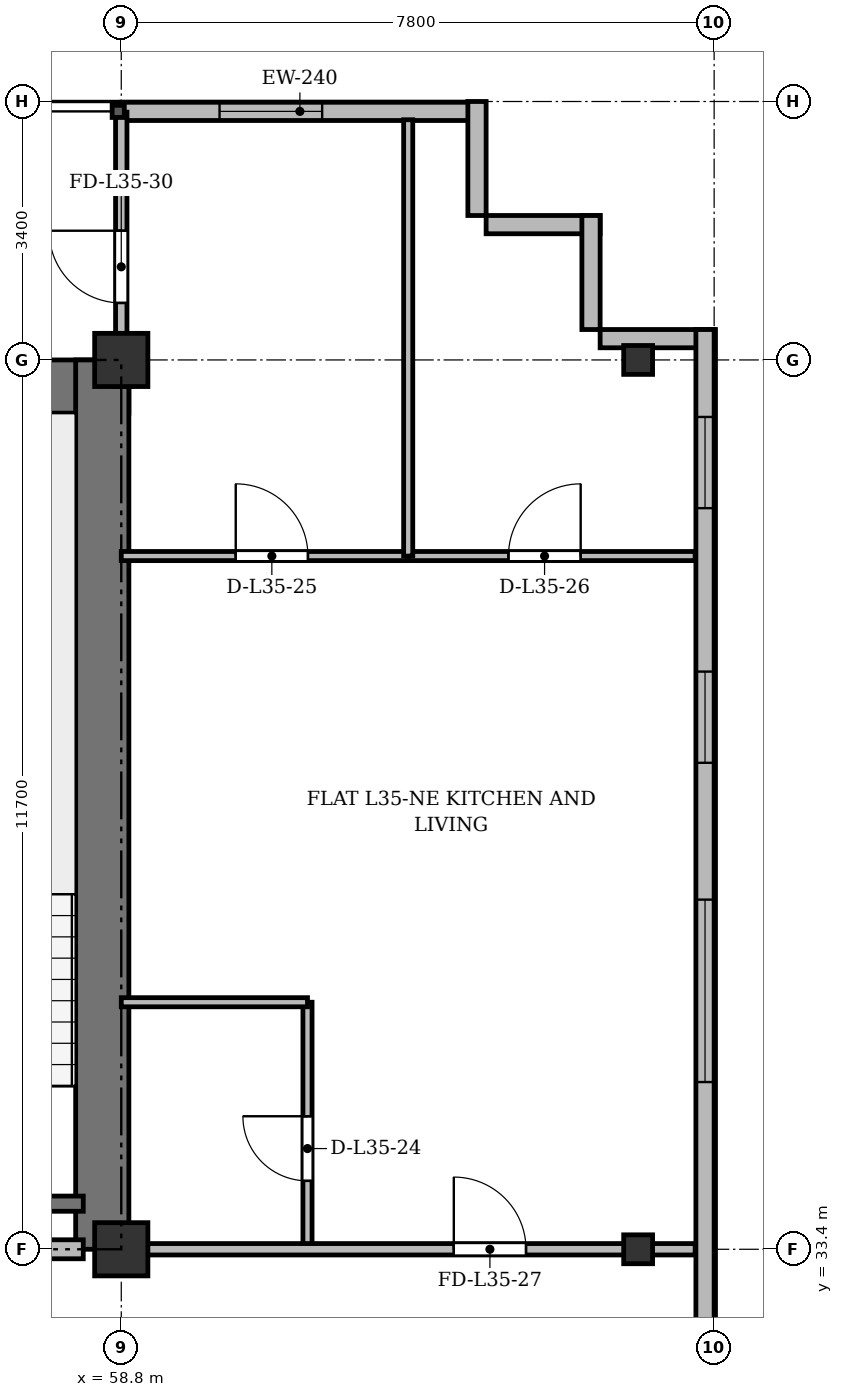
"""IFC4 building model, lengths in metres.
Left out: names, types, materials, properties, quantities, classifications, styles, units other than length and angle.
Written with IfcOpenShell. Run it as: python <this file> out.ifc"""

import sys

from ifc_helpers import new_model, si_unit, direction, frame, frame_2d, origin, origin_2d, place, context, subcontext, project, spatial, rectangle, i_section, extrude, source, transform, mapped, element, fill, save


model = new_model("IFC4")
c1 = context("Model", 3, precision=1e-05, world=origin(), true_north=direction((0.0, 1.0)))
c2 = subcontext(c1, "Body", "Model", "MODEL_VIEW")
j1 = project(units=[si_unit("LENGTHUNIT", "METRE"), si_unit("PLANEANGLEUNIT", "RADIAN")], contexts=[c1])
p1 = place(None, origin())
s1 = spatial("IfcSite", under=j1, at=p1, CompositionType="ELEMENT")
p2 = place(p1, origin())
s2 = spatial("IfcBuilding", under=s1, at=p2, CompositionType="ELEMENT")
p3 = place(p2, frame((0.0, 0.0, 135.7)))
s3 = spatial("IfcBuildingStorey", under=s2, at=p3, CompositionType="ELEMENT", Elevation=135.7)
m1 = source(origin(), c2, "Body", "SweptSolid", [
    extrude(rectangle(XDim=0.7, YDim=0.7, at=origin_2d()), origin(), (0.0, 0.0, 1.0), 3.6),
])
for number, where, z_axis, x_axis in (
    (1, (58.8, 33.4, 0.0), (0.0, 0.0, 1.0), (1.0, 0.0, 0.0)),
    (2, (58.8, 45.1, 0.0), (0.0, 0.0, 1.0), (1.0, 0.0, 0.0)),
):
    element("IfcColumn", number, at=place(p3, frame(where, z_axis=z_axis, x_axis=x_axis)), inside=s3, PredefinedType="COLUMN", context=c2, shape_type="MappedRepresentation", body=[
        mapped(m1, transform((0.0, 0.0, 0.0), x_axis=(1.0, 0.0, 0.0), y_axis=(0.0, 1.0, 0.0), z_axis=(0.0, 0.0, 1.0), scale=1.0)),
    ])
m2 = source(origin(), c2, "Body", "SweptSolid", [
    extrude(i_section(OverallWidth=0.38, OverallDepth=0.38, WebThickness=0.02, FlangeThickness=0.03, at=origin_2d()), origin(), (0.0, 0.0, 1.0), 3.6),
])
for number, where, z_axis, x_axis in (
    (3, (65.6, 33.4, 0.0), (0.0, 0.0, 1.0), (1.0, 0.0, 0.0)),
    (4, (65.6, 45.1, 0.0), (0.0, 0.0, 1.0), (1.0, 0.0, 0.0)),
):
    element("IfcColumn", number, at=place(p3, frame(where, z_axis=z_axis, x_axis=x_axis)), inside=s3, PredefinedType="COLUMN", context=c2, shape_type="MappedRepresentation", body=[
        mapped(m2, transform((0.0, 0.0, 0.0), x_axis=(1.0, 0.0, 0.0), y_axis=(0.0, 1.0, 0.0), z_axis=(0.0, 0.0, 1.0), scale=1.0)),
    ])
p4 = place(p3, frame((58.8, 48.37, 0.0), z_axis=(0.0, 0.0, 1.0), x_axis=(1.0, 0.0, 0.0)))
e5 = element("IfcWall", 5, at=p4, inside=s3, PredefinedType="SOLIDWALL", context=c2, shape_type="SweptSolid", body=[
    extrude(rectangle(XDim=4.7, YDim=0.24, at=frame_2d((2.35, 0.0))), origin(), (0.0, 0.0, 1.0), 3.35),
])
p5 = place(p4, frame((1.293, 0.0, 0.9)))
e6 = element("IfcOpeningElement", 6, at=p5, cuts=e5, PredefinedType="OPENING", context=c2, shape_type="SweptSolid", body=[
    extrude(rectangle(XDim=1.35, YDim=1.5, at=frame_2d((0.675, 0.75))), frame((0.0, 0.13, 0.0), z_axis=(0.0, -1.0, 0.0), x_axis=(1.0, 0.0, 0.0)), (0.0, 0.0, 1.0), 0.26),
])
for number, where, z_axis, x_axis in (
    (7, (63.48, 48.5, 0.0), (0.0, 0.0, 1.0), (0.0, -1.0, 0.0)),
    (8, (63.6, 46.88, 0.0), (0.0, 0.0, 1.0), (1.0, 0.0, 0.0)),
    (9, (64.98, 47.0, 0.0), (0.0, 0.0, 1.0), (0.0, -1.0, 0.0)),
    (10, (65.1, 45.38, 0.0), (0.0, 0.0, 1.0), (1.0, 0.0, 0.0)),
):
    element("IfcWall", number, at=place(p3, frame(where, z_axis=z_axis, x_axis=x_axis)), inside=s3, PredefinedType="SOLIDWALL", context=c2, shape_type="SweptSolid", body=[
        extrude(rectangle(XDim=1.5, YDim=0.24, at=frame_2d((0.75, 0.0))), origin(), (0.0, 0.0, 1.0), 3.35),
    ])
p6 = place(p3, frame((66.48, 45.5, 0.0), z_axis=(0.0, 0.0, 1.0), x_axis=(0.0, -1.0, 0.0)))
e11 = element("IfcWall", 11, at=p6, inside=s3, PredefinedType="SOLIDWALL", context=c2, shape_type="SweptSolid", body=[
    extrude(rectangle(XDim=39.2, YDim=0.24, at=frame_2d((19.6, 0.0))), origin(), (0.0, 0.0, 1.0), 3.35),
])
p7 = place(p6, frame((36.55, 0.0, 0.92)))
e12 = element("IfcOpeningElement", 12, at=p7, cuts=e11, PredefinedType="OPENING", context=c2, shape_type="SweptSolid", body=[
    extrude(rectangle(XDim=1.2, YDim=1.65, at=frame_2d((0.6, 0.825))), frame((0.0, 0.13, 0.0), z_axis=(0.0, -1.0, 0.0), x_axis=(1.0, 0.0, 0.0)), (0.0, 0.0, 1.0), 0.26),
])
p8 = place(p6, frame((32.9, 0.0, 0.92)))
e13 = element("IfcOpeningElement", 13, at=p8, cuts=e11, PredefinedType="OPENING", context=c2, shape_type="SweptSolid", body=[
    extrude(rectangle(XDim=2.4, YDim=2.1, at=frame_2d((1.2, 1.05))), frame((0.0, 0.13, 0.0), z_axis=(0.0, -1.0, 0.0), x_axis=(1.0, 0.0, 0.0)), (0.0, 0.0, 1.0), 0.26),
])
p9 = place(p6, frame((28.7, 0.0, 0.92)))
e14 = element("IfcOpeningElement", 14, at=p9, cuts=e11, PredefinedType="OPENING", context=c2, shape_type="SweptSolid", body=[
    extrude(rectangle(XDim=2.4, YDim=2.1, at=frame_2d((1.2, 1.05))), frame((0.0, 0.13, 0.0), z_axis=(0.0, -1.0, 0.0), x_axis=(1.0, 0.0, 0.0)), (0.0, 0.0, 1.0), 0.26),
])
p10 = place(p6, frame((21.5, 0.0, 0.92)))
e15 = element("IfcOpeningElement", 15, at=p10, cuts=e11, PredefinedType="OPENING", context=c2, shape_type="SweptSolid", body=[
    extrude(rectangle(XDim=2.4, YDim=2.1, at=frame_2d((1.2, 1.05))), frame((0.0, 0.13, 0.0), z_axis=(0.0, -1.0, 0.0), x_axis=(1.0, 0.0, 0.0)), (0.0, 0.0, 1.0), 0.26),
])
p11 = place(p6, frame((7.5, 0.0, 0.92)))
e16 = element("IfcOpeningElement", 16, at=p11, cuts=e11, PredefinedType="OPENING", context=c2, shape_type="SweptSolid", body=[
    extrude(rectangle(XDim=2.4, YDim=2.1, at=frame_2d((1.2, 1.05))), frame((0.0, 0.13, 0.0), z_axis=(0.0, -1.0, 0.0), x_axis=(1.0, 0.0, 0.0)), (0.0, 0.0, 1.0), 0.26),
])
p12 = place(p6, frame((4.5, 0.0, 0.92)))
e17 = element("IfcOpeningElement", 17, at=p12, cuts=e11, PredefinedType="OPENING", context=c2, shape_type="SweptSolid", body=[
    extrude(rectangle(XDim=1.2, YDim=1.65, at=frame_2d((0.6, 0.825))), frame((0.0, 0.13, 0.0), z_axis=(0.0, -1.0, 0.0), x_axis=(1.0, 0.0, 0.0)), (0.0, 0.0, 1.0), 0.26),
])
p13 = place(p6, frame((1.15, 0.0, 0.92)))
e18 = element("IfcOpeningElement", 18, at=p13, cuts=e11, PredefinedType="OPENING", context=c2, shape_type="SweptSolid", body=[
    extrude(rectangle(XDim=1.2, YDim=1.65, at=frame_2d((0.6, 0.825))), frame((0.0, 0.13, 0.0), z_axis=(0.0, -1.0, 0.0), x_axis=(1.0, 0.0, 0.0)), (0.0, 0.0, 1.0), 0.26),
])
p14 = place(p3, frame((15.5, 44.75, 0.0), z_axis=(0.0, 0.0, 1.0), x_axis=(1.0, 0.0, 0.0)))
e19 = element("IfcWall", 19, at=p14, inside=s3, PredefinedType="SHEAR", context=c2, shape_type="SweptSolid", body=[
    extrude(rectangle(XDim=43.4, YDim=0.7, at=frame_2d((21.7, 0.0))), origin(), (0.0, 0.0, 1.0), 3.35),
])
p15 = place(p3, frame((58.55, 33.4, 0.0), z_axis=(0.0, 0.0, 1.0), x_axis=(0.0, 1.0, 0.0)))
e20 = element("IfcWall", 20, at=p15, inside=s3, PredefinedType="SHEAR", context=c2, shape_type="SweptSolid", body=[
    extrude(rectangle(XDim=11.7, YDim=0.7, at=frame_2d((5.85, 0.0))), origin(), (0.0, 0.0, 1.0), 3.35),
])
p16 = place(p3, frame((54.9, 34.0, 0.0), z_axis=(0.0, 0.0, 1.0), x_axis=(1.0, 0.0, 0.0)))
e21 = element("IfcWall", 21, at=p16, inside=s3, PredefinedType="SHEAR", context=c2, shape_type="SweptSolid", body=[
    extrude(rectangle(XDim=3.4, YDim=0.2, at=frame_2d((1.7, 0.0))), origin(), (0.0, 0.0, 1.0), 3.35),
])
p17 = place(p3, frame((47.15, 33.4, 0.0), z_axis=(0.0, 0.0, 1.0), x_axis=(1.0, 0.0, 0.0)))
e22 = element("IfcWall", 22, at=p17, inside=s3, PredefinedType="PARTITIONING", context=c2, shape_type="SweptSolid", body=[
    extrude(rectangle(XDim=11.15, YDim=0.25, at=frame_2d((5.575, 0.0))), origin(), (0.0, 0.0, 1.0), 2.75),
])
p18 = place(p17, frame((0.7, 0.0, 0.0)))
e23 = element("IfcOpeningElement", 23, at=p18, cuts=e22, PredefinedType="OPENING", context=c2, shape_type="SweptSolid", body=[
    extrude(rectangle(XDim=0.95, YDim=2.15, at=frame_2d((0.475, 1.075))), frame((0.0, 0.135, 0.0), z_axis=(0.0, -1.0, 0.0), x_axis=(1.0, 0.0, 0.0)), (0.0, 0.0, 1.0), 0.27),
])
p19 = place(p17, frame((6.0, 0.0, 0.0)))
e24 = element("IfcOpeningElement", 24, at=p19, cuts=e22, PredefinedType="OPENING", context=c2, shape_type="SweptSolid", body=[
    extrude(rectangle(XDim=1.2, YDim=2.15, at=frame_2d((0.6, 1.075))), frame((0.0, 0.135, 0.0), z_axis=(0.0, -1.0, 0.0), x_axis=(1.0, 0.0, 0.0)), (0.0, 0.0, 1.0), 0.27),
])
p20 = place(p3, frame((61.25, 33.4, 0.0), z_axis=(0.0, 0.0, 1.0), x_axis=(0.0, 1.0, 0.0)))
e25 = element("IfcWall", 25, at=p20, inside=s3, PredefinedType="PARTITIONING", context=c2, shape_type="SweptSolid", body=[
    extrude(rectangle(XDim=3.25, YDim=0.12, at=frame_2d((1.625, 0.0))), origin(), (0.0, 0.0, 1.0), 2.75),
])
p21 = place(p20, frame((0.9, 0.0, 0.0)))
e26 = element("IfcOpeningElement", 26, at=p21, cuts=e25, PredefinedType="OPENING", context=c2, shape_type="SweptSolid", body=[
    extrude(rectangle(XDim=0.85, YDim=2.1, at=frame_2d((0.425, 1.05))), frame((0.0, 0.07, 0.0), z_axis=(0.0, -1.0, 0.0), x_axis=(1.0, 0.0, 0.0)), (0.0, 0.0, 1.0), 0.14),
])
p22 = place(p3, frame((58.8, 36.65, 0.0), z_axis=(0.0, 0.0, 1.0), x_axis=(1.0, 0.0, 0.0)))
e27 = element("IfcWall", 27, at=p22, inside=s3, PredefinedType="PARTITIONING", context=c2, shape_type="SweptSolid", body=[
    extrude(rectangle(XDim=2.45, YDim=0.12, at=frame_2d((1.225, 0.0))), origin(), (0.0, 0.0, 1.0), 2.85),
])
p23 = place(p3, frame((58.8, 42.52, 0.0), z_axis=(0.0, 0.0, 1.0), x_axis=(1.0, 0.0, 0.0)))
e28 = element("IfcWall", 28, at=p23, inside=s3, PredefinedType="PARTITIONING", context=c2, shape_type="SweptSolid", body=[
    extrude(rectangle(XDim=3.775, YDim=0.12, at=frame_2d((1.887, 0.0))), origin(), (0.0, 0.0, 1.0), 2.85),
])
p24 = place(p23, frame((1.506, 0.0, 0.0)))
e29 = element("IfcOpeningElement", 29, at=p24, cuts=e28, PredefinedType="OPENING", context=c2, shape_type="SweptSolid", body=[
    extrude(rectangle(XDim=0.95, YDim=2.15, at=frame_2d((0.475, 1.075))), frame((0.0, 0.07, 0.0), z_axis=(0.0, -1.0, 0.0), x_axis=(1.0, 0.0, 0.0)), (0.0, 0.0, 1.0), 0.14),
])
p25 = place(p3, frame((62.575, 42.52, 0.0), z_axis=(0.0, 0.0, 1.0), x_axis=(1.0, 0.0, 0.0)))
e30 = element("IfcWall", 30, at=p25, inside=s3, PredefinedType="PARTITIONING", context=c2, shape_type="SweptSolid", body=[
    extrude(rectangle(XDim=3.775, YDim=0.12, at=frame_2d((1.888, 0.0))), origin(), (0.0, 0.0, 1.0), 2.85),
])
p26 = place(p25, frame((1.319, 0.0, 0.0)))
e31 = element("IfcOpeningElement", 31, at=p26, cuts=e30, PredefinedType="OPENING", context=c2, shape_type="SweptSolid", body=[
    extrude(rectangle(XDim=0.95, YDim=2.15, at=frame_2d((0.475, 1.075))), frame((0.0, 0.07, 0.0), z_axis=(0.0, -1.0, 0.0), x_axis=(1.0, 0.0, 0.0)), (0.0, 0.0, 1.0), 0.14),
])
p27 = place(p3, frame((62.575, 42.52, 0.0), z_axis=(0.0, 0.0, 1.0), x_axis=(0.0, 1.0, 0.0)))
e32 = element("IfcWall", 32, at=p27, inside=s3, PredefinedType="PARTITIONING", context=c2, shape_type="SweptSolid", body=[
    extrude(rectangle(XDim=5.74, YDim=0.12, at=frame_2d((2.87, 0.0))), origin(), (0.0, 0.0, 1.0), 2.75),
])
p28 = place(p3, frame((58.8, 33.4, 0.0), z_axis=(0.0, 0.0, 1.0), x_axis=(1.0, 0.0, 0.0)))
e33 = element("IfcWall", 33, at=p28, inside=s3, PredefinedType="PARTITIONING", context=c2, shape_type="SweptSolid", body=[
    extrude(rectangle(XDim=7.55, YDim=0.15, at=frame_2d((3.775, 0.0))), origin(), (0.0, 0.0, 1.0), 2.75),
])
p29 = place(p28, frame((4.375, 0.0, 0.0)))
e34 = element("IfcOpeningElement", 34, at=p29, cuts=e33, PredefinedType="OPENING", context=c2, shape_type="SweptSolid", body=[
    extrude(rectangle(XDim=0.95, YDim=2.15, at=frame_2d((0.475, 1.075))), frame((0.0, 0.085, 0.0), z_axis=(0.0, -1.0, 0.0), x_axis=(1.0, 0.0, 0.0)), (0.0, 0.0, 1.0), 0.17),
])
p30 = place(p3, frame((58.8, 44.75, 0.0), z_axis=(0.0, 0.0, 1.0), x_axis=(0.0, 1.0, 0.0)))
e35 = element("IfcWall", 35, at=p30, inside=s3, PredefinedType="PARTITIONING", context=c2, shape_type="SweptSolid", body=[
    extrude(rectangle(XDim=3.61, YDim=0.15, at=frame_2d((1.805, 0.0))), origin(), (0.0, 0.0, 1.0), 2.85),
])
p31 = place(p30, frame((1.1, 0.0, 0.0)))
e36 = element("IfcOpeningElement", 36, at=p31, cuts=e35, PredefinedType="OPENING", context=c2, shape_type="SweptSolid", body=[
    extrude(rectangle(XDim=0.95, YDim=2.15, at=frame_2d((0.475, 1.075))), frame((0.0, 0.085, 0.0), z_axis=(0.0, -1.0, 0.0), x_axis=(1.0, 0.0, 0.0)), (0.0, 0.0, 1.0), 0.17),
])
m3 = source(origin(), c2, "Body", "SweptSolid", [
    extrude(rectangle(XDim=1.35, YDim=1.5, at=frame_2d((0.675, 0.75))), frame((0.0, 0.03, 0.0), z_axis=(0.0, -1.0, 0.0), x_axis=(1.0, 0.0, 0.0)), (0.0, 0.0, 1.0), 0.06),
])
p32 = place(p5, origin())
e37 = element("IfcWindow", 37, at=p32, inside=s3, PartitioningType="SINGLE_PANEL", PredefinedType="WINDOW", context=c2, shape_type="MappedRepresentation", body=[
    mapped(m3, transform((0.0, 0.0, 0.0), x_axis=(1.0, 0.0, 0.0), y_axis=(0.0, 1.0, 0.0), z_axis=(0.0, 0.0, 1.0), scale=1.0)),
])
fill(e6, e37)
m4 = source(origin(), c2, "Body", "SweptSolid", [
    extrude(rectangle(XDim=2.4, YDim=2.1, at=frame_2d((1.2, 1.05))), frame((0.0, 0.03, 0.0), z_axis=(0.0, -1.0, 0.0), x_axis=(1.0, 0.0, 0.0)), (0.0, 0.0, 1.0), 0.06),
])
p33 = place(p11, origin())
e38 = element("IfcWindow", 38, at=p33, inside=s3, PartitioningType="SINGLE_PANEL", PredefinedType="WINDOW", context=c2, shape_type="MappedRepresentation", body=[
    mapped(m4, transform((0.0, 0.0, 0.0), x_axis=(1.0, 0.0, 0.0), y_axis=(0.0, 1.0, 0.0), z_axis=(0.0, 0.0, 1.0), scale=1.0)),
])
fill(e16, e38)
m5 = source(origin(), c2, "Body", "SweptSolid", [
    extrude(rectangle(XDim=1.2, YDim=1.65, at=frame_2d((0.6, 0.825))), frame((0.0, 0.03, 0.0), z_axis=(0.0, -1.0, 0.0), x_axis=(1.0, 0.0, 0.0)), (0.0, 0.0, 1.0), 0.06),
])
p34 = place(p12, origin())
e39 = element("IfcWindow", 39, at=p34, inside=s3, PartitioningType="SINGLE_PANEL", PredefinedType="WINDOW", context=c2, shape_type="MappedRepresentation", body=[
    mapped(m5, transform((0.0, 0.0, 0.0), x_axis=(1.0, 0.0, 0.0), y_axis=(0.0, 1.0, 0.0), z_axis=(0.0, 0.0, 1.0), scale=1.0)),
])
fill(e17, e39)
p35 = place(p13, origin())
e40 = element("IfcWindow", 40, at=p35, inside=s3, PartitioningType="SINGLE_PANEL", PredefinedType="WINDOW", context=c2, shape_type="MappedRepresentation", body=[
    mapped(m5, transform((0.0, 0.0, 0.0), x_axis=(1.0, 0.0, 0.0), y_axis=(0.0, 1.0, 0.0), z_axis=(0.0, 0.0, 1.0), scale=1.0)),
])
fill(e18, e40)
m6 = source(origin(), c2, "Body", "SweptSolid", [
    extrude(rectangle(XDim=0.85, YDim=2.1, at=frame_2d((0.425, 1.05))), frame((0.0, 0.025, 0.0), z_axis=(0.0, -1.0, 0.0), x_axis=(1.0, 0.0, 0.0)), (0.0, 0.0, 1.0), 0.05),
])
p36 = place(p21, origin())
e41 = element("IfcDoor", 41, at=p36, inside=s3, OperationType="SINGLE_SWING_RIGHT", PredefinedType="DOOR", context=c2, shape_type="MappedRepresentation", body=[
    mapped(m6, transform((0.0, 0.0, 0.0), x_axis=(1.0, 0.0, 0.0), y_axis=(0.0, 1.0, 0.0), z_axis=(0.0, 0.0, 1.0), scale=1.0)),
])
fill(e26, e41)
m7 = source(origin(), c2, "Body", "SweptSolid", [
    extrude(rectangle(XDim=0.95, YDim=2.15, at=frame_2d((0.475, 1.075))), frame((0.0, 0.025, 0.0), z_axis=(0.0, -1.0, 0.0), x_axis=(1.0, 0.0, 0.0)), (0.0, 0.0, 1.0), 0.05),
])
p37 = place(p24, origin())
e42 = element("IfcDoor", 42, at=p37, inside=s3, OperationType="SINGLE_SWING_LEFT", PredefinedType="DOOR", context=c2, shape_type="MappedRepresentation", body=[
    mapped(m7, transform((0.0, 0.0, 0.0), x_axis=(1.0, 0.0, 0.0), y_axis=(0.0, 1.0, 0.0), z_axis=(0.0, 0.0, 1.0), scale=1.0)),
])
fill(e29, e42)
p38 = place(p26, origin())
e43 = element("IfcDoor", 43, at=p38, inside=s3, OperationType="SINGLE_SWING_RIGHT", PredefinedType="DOOR", context=c2, shape_type="MappedRepresentation", body=[
    mapped(m7, transform((0.0, 0.0, 0.0), x_axis=(1.0, 0.0, 0.0), y_axis=(0.0, 1.0, 0.0), z_axis=(0.0, 0.0, 1.0), scale=1.0)),
])
fill(e31, e43)
p39 = place(p29, origin())
e44 = element("IfcDoor", 44, at=p39, inside=s3, OperationType="SINGLE_SWING_LEFT", PredefinedType="DOOR", context=c2, shape_type="MappedRepresentation", body=[
    mapped(m7, transform((0.0, 0.0, 0.0), x_axis=(1.0, 0.0, 0.0), y_axis=(0.0, 1.0, 0.0), z_axis=(0.0, 0.0, 1.0), scale=1.0)),
])
fill(e34, e44)
p40 = place(p31, origin())
e45 = element("IfcDoor", 45, at=p40, inside=s3, OperationType="SINGLE_SWING_RIGHT", PredefinedType="DOOR", context=c2, shape_type="MappedRepresentation", body=[
    mapped(m7, transform((0.0, 0.0, 0.0), x_axis=(1.0, 0.0, 0.0), y_axis=(0.0, 1.0, 0.0), z_axis=(0.0, 0.0, 1.0), scale=1.0)),
])
fill(e36, e45)
save(model, sys.argv[1])
